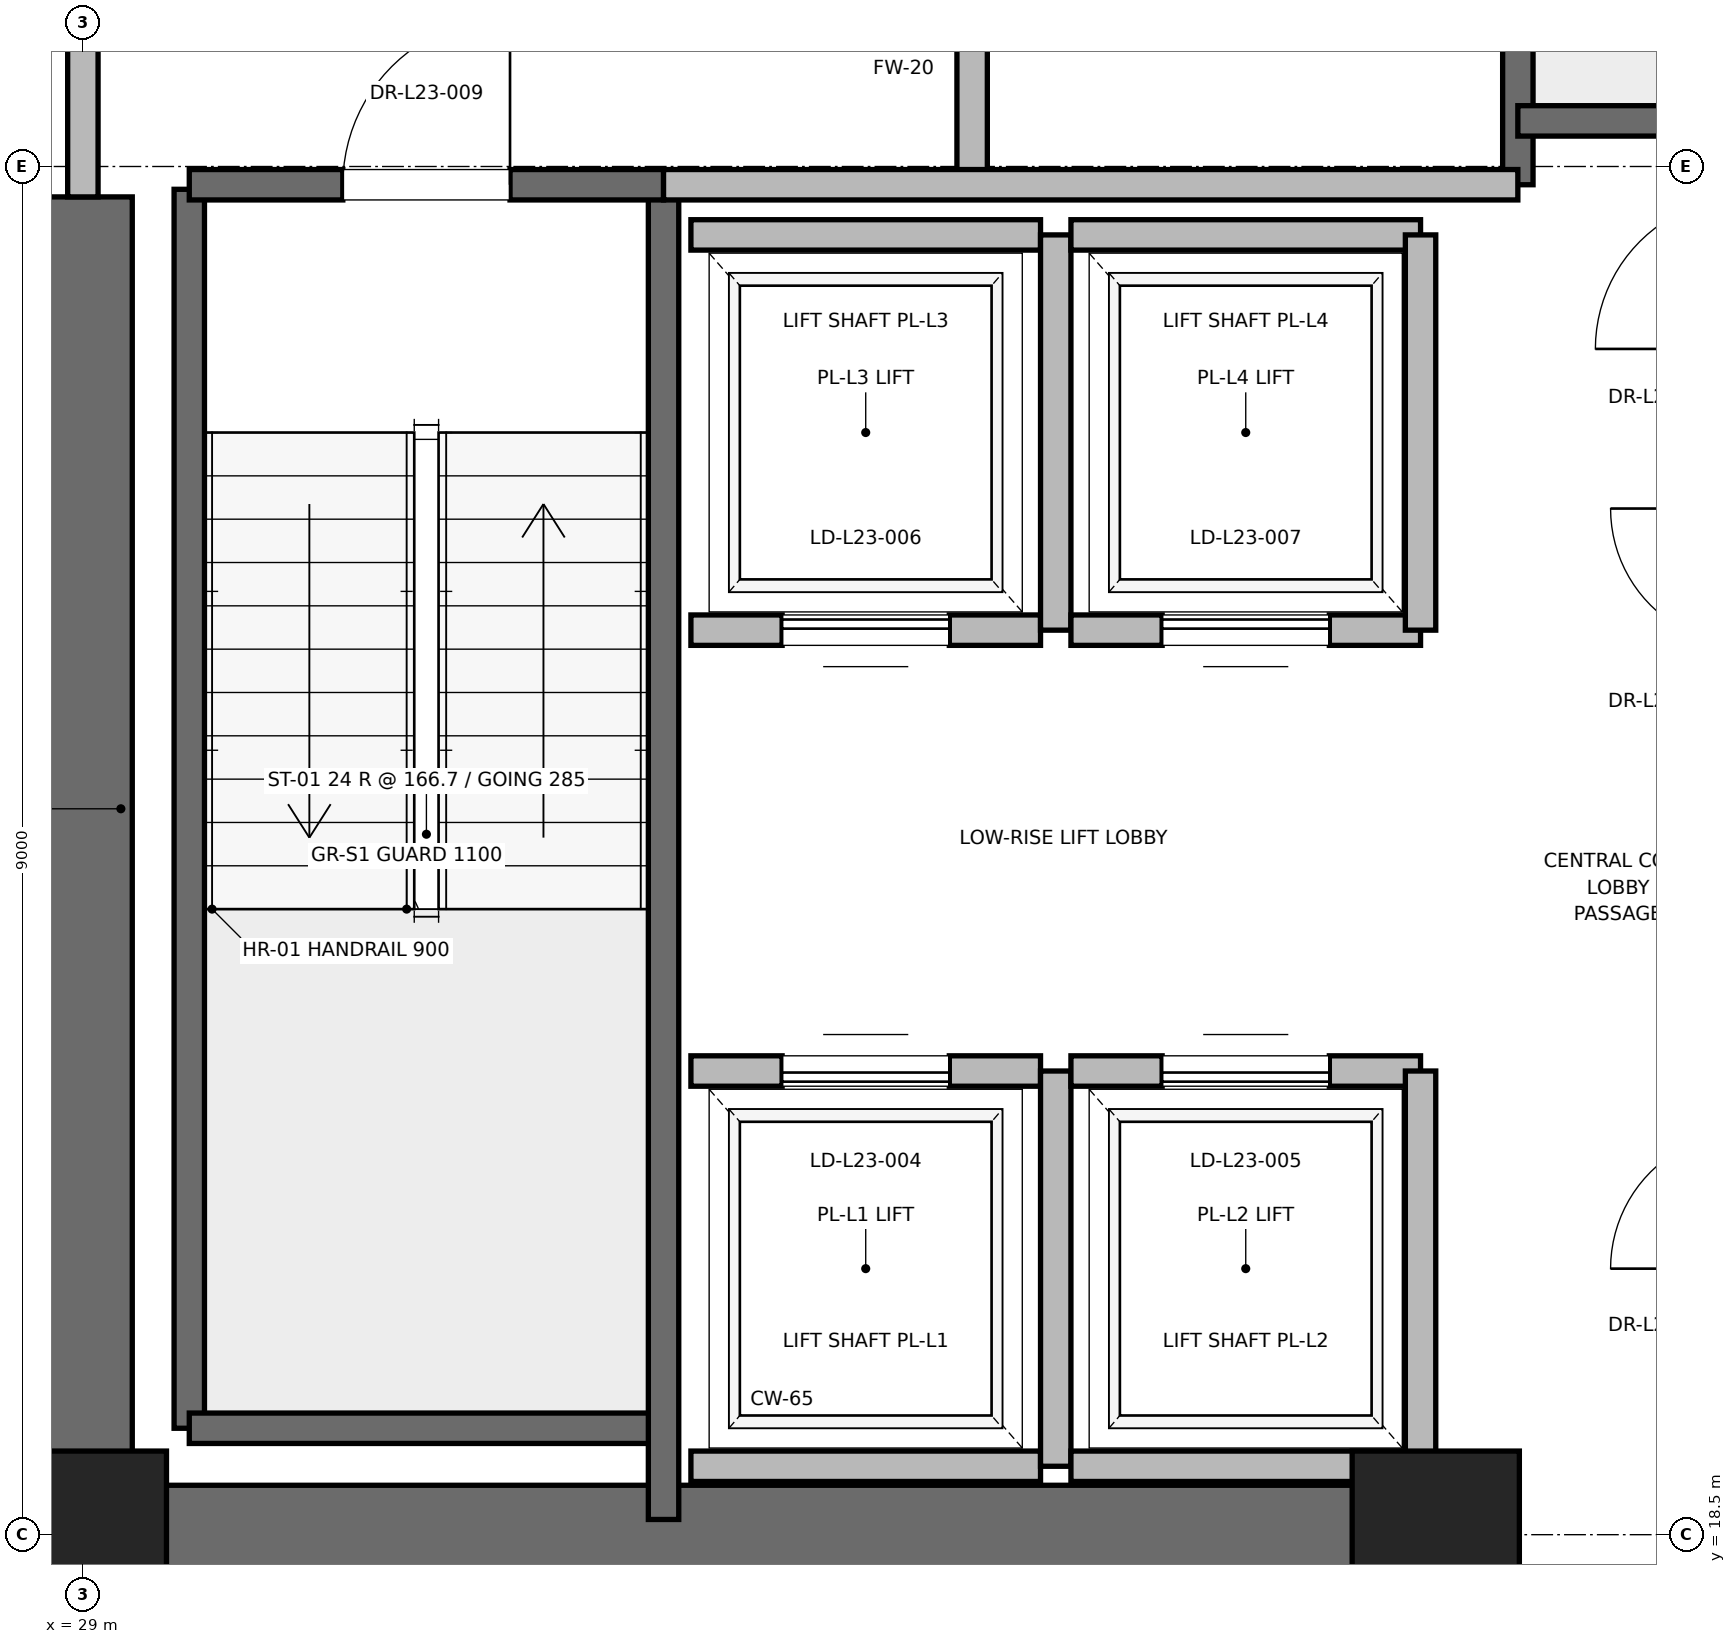
"""IFC4 building model, lengths in metres.
Left out: names, types, materials, properties, quantities, classifications, styles, units other than length and angle.
Written with IfcOpenShell. Run it as: python <this file> out.ifc"""

import sys

from ifc_helpers import new_model, si_unit, direction, frame, frame_2d, origin, origin_2d, place, context, subcontext, project, spatial, rectangle, extrude, element, fill, save


model = new_model("IFC4")
c1 = context("Model", 3, precision=1e-05, world=origin(), true_north=direction((0.0, 1.0)))
c2 = subcontext(c1, "Body", "Model", "MODEL_VIEW")
j1 = project(units=[si_unit("LENGTHUNIT", "METRE"), si_unit("PLANEANGLEUNIT", "RADIAN")], contexts=[c1])
p1 = place(None, origin())
s1 = spatial("IfcSite", under=j1, at=p1, CompositionType="ELEMENT")
p2 = place(p1, origin())
s2 = spatial("IfcBuilding", under=s1, at=p2, CompositionType="ELEMENT")
p3 = place(p2, frame((0.0, 0.0, 99.6)))
s3 = spatial("IfcBuildingStorey", under=s2, at=p3, CompositionType="ELEMENT", Elevation=99.6)
for number, where, z_axis, x_axis in (
    (1, (29.0, 18.5, 0.0), (0.0, 0.0, 1.0), (1.0, 0.0, 0.0)),
    (2, (37.9, 18.5, 0.0), (0.0, 0.0, 1.0), (1.0, 0.0, 0.0)),
):
    element("IfcColumn", number, at=place(p3, frame(where, z_axis=z_axis, x_axis=x_axis)), inside=s3, PredefinedType="PILASTER", context=c2, shape_type="SweptSolid", body=[
        extrude(rectangle(XDim=1.1, YDim=1.1, at=origin_2d()), origin(), (0.0, 0.0, 1.0), 4.0),
    ])
p4 = place(p3, frame((29.0, 18.5, 0.0), z_axis=(0.0, 0.0, 1.0), x_axis=(1.0, 0.0, 0.0)))
e3 = element("IfcWall", 3, at=p4, inside=s3, PredefinedType="SHEAR", context=c2, shape_type="SweptSolid", body=[
    extrude(rectangle(XDim=9.2, YDim=0.65, at=frame_2d((4.6, 0.0))), origin(), (0.0, 0.0, 1.0), 3.76),
])
p5 = place(p3, frame((29.0, 18.5, 0.0), z_axis=(0.0, 0.0, 1.0), x_axis=(0.0, 1.0, 0.0)))
e4 = element("IfcWall", 4, at=p5, inside=s3, PredefinedType="SHEAR", context=c2, shape_type="SweptSolid", body=[
    extrude(rectangle(XDim=8.8, YDim=0.65, at=frame_2d((4.4, 0.0))), origin(), (0.0, 0.0, 1.0), 3.76),
])
p6 = place(p3, frame((29.7, 19.2, 0.0), z_axis=(0.0, 0.0, 1.0), x_axis=(0.0, 1.0, 0.0)))
e5 = element("IfcWall", 5, at=p6, inside=s3, PredefinedType="SOLIDWALL", context=c2, shape_type="SweptSolid", body=[
    extrude(rectangle(XDim=8.15, YDim=0.2, at=frame_2d((4.075, 0.0))), origin(), (0.0, 0.0, 1.0), 3.76),
])
p7 = place(p3, frame((29.7, 19.2, 0.0), z_axis=(0.0, 0.0, 1.0), x_axis=(1.0, 0.0, 0.0)))
e6 = element("IfcWall", 6, at=p7, inside=s3, PredefinedType="SOLIDWALL", context=c2, shape_type="SweptSolid", body=[
    extrude(rectangle(XDim=3.12, YDim=0.2, at=frame_2d((1.56, 0.0))), origin(), (0.0, 0.0, 1.0), 3.76),
])
p8 = place(p3, frame((32.82, 18.6, 0.0), z_axis=(0.0, 0.0, 1.0), x_axis=(0.0, 1.0, 0.0)))
e7 = element("IfcWall", 7, at=p8, inside=s3, PredefinedType="SOLIDWALL", context=c2, shape_type="SweptSolid", body=[
    extrude(rectangle(XDim=8.78, YDim=0.2, at=frame_2d((4.39, 0.0))), origin(), (0.0, 0.0, 1.0), 3.76),
])
p9 = place(p3, frame((29.7, 27.38, 0.0), z_axis=(0.0, 0.0, 1.0), x_axis=(1.0, 0.0, 0.0)))
e8 = element("IfcWall", 8, at=p9, inside=s3, PredefinedType="SOLIDWALL", context=c2, shape_type="SweptSolid", body=[
    extrude(rectangle(XDim=3.12, YDim=0.2, at=frame_2d((1.56, 0.0))), origin(), (0.0, 0.0, 1.0), 3.76),
])
p10 = place(p9, frame((1.01, 0.0, 0.0)))
e9 = element("IfcOpeningElement", 9, at=p10, cuts=e8, PredefinedType="OPENING", context=c2, shape_type="SweptSolid", body=[
    extrude(rectangle(XDim=1.1, YDim=2.15, at=frame_2d((0.55, 1.075))), frame((0.0, 0.1, 0.0), z_axis=(0.0, -1.0, 0.0), x_axis=(1.0, 0.0, 0.0)), (0.0, 0.0, 1.0), 0.2),
])
p11 = place(p3, frame((38.44, 27.38, 0.0), z_axis=(0.0, 0.0, 1.0), x_axis=(0.0, 1.0, 0.0)))
e10 = element("IfcWall", 10, at=p11, inside=s3, PredefinedType="SOLIDWALL", context=c2, shape_type="SweptSolid", body=[
    extrude(rectangle(XDim=8.87, YDim=0.2, at=frame_2d((4.435, 0.0))), origin(), (0.0, 0.0, 1.0), 3.76),
])
p12 = place(p3, frame((38.44, 27.8, 0.0), z_axis=(0.0, 0.0, 1.0), x_axis=(1.0, 0.0, 0.0)))
e11 = element("IfcWall", 11, at=p12, inside=s3, PredefinedType="SOLIDWALL", context=c2, shape_type="SweptSolid", body=[
    extrude(rectangle(XDim=3.32, YDim=0.2, at=frame_2d((1.66, 0.0))), origin(), (0.0, 0.0, 1.0), 3.76),
])
p13 = place(p3, frame((34.85, 27.38, 0.0), z_axis=(0.0, 0.0, 1.0), x_axis=(0.0, 1.0, 0.0)))
e12 = element("IfcWall", 12, at=p13, inside=s3, PredefinedType="PARTITIONING", context=c2, shape_type="SweptSolid", body=[
    extrude(rectangle(XDim=3.37, YDim=0.2, at=frame_2d((1.685, 0.0))), origin(), (0.0, 0.0, 1.0), 3.76),
])
p14 = place(p13, frame((1.11, 0.0, 0.0)))
e13 = element("IfcOpeningElement", 13, at=p14, cuts=e12, PredefinedType="OPENING", context=c2, shape_type="SweptSolid", body=[
    extrude(rectangle(XDim=1.15, YDim=2.2, at=frame_2d((0.575, 1.1))), frame((0.0, 0.1, 0.0), z_axis=(0.0, -1.0, 0.0), x_axis=(1.0, 0.0, 0.0)), (0.0, 0.0, 1.0), 0.2),
])
p15 = place(p3, frame((29.0, 27.3, 0.0), z_axis=(0.0, 0.0, 1.0), x_axis=(0.0, 1.0, 0.0)))
e14 = element("IfcWall", 14, at=p15, inside=s3, PredefinedType="PARTITIONING", context=c2, shape_type="SweptSolid", body=[
    extrude(rectangle(XDim=3.4, YDim=0.2, at=frame_2d((1.7, 0.0))), origin(), (0.0, 0.0, 1.0), 2.54),
])
p16 = place(p15, frame((1.125, 0.0, 0.0)))
e15 = element("IfcOpeningElement", 15, at=p16, cuts=e14, PredefinedType="OPENING", context=c2, shape_type="SweptSolid", body=[
    extrude(rectangle(XDim=1.15, YDim=2.2, at=frame_2d((0.575, 1.1))), frame((0.0, 0.1, 0.0), z_axis=(0.0, -1.0, 0.0), x_axis=(1.0, 0.0, 0.0)), (0.0, 0.0, 1.0), 0.2),
])
p17 = place(p3, frame((32.82, 27.38, 0.0), z_axis=(0.0, 0.0, 1.0), x_axis=(1.0, 0.0, 0.0)))
e16 = element("IfcWall", 16, at=p17, inside=s3, PredefinedType="PARTITIONING", context=c2, shape_type="SweptSolid", body=[
    extrude(rectangle(XDim=5.62, YDim=0.2, at=frame_2d((2.81, 0.0))), origin(), (0.0, 0.0, 1.0), 3.76),
])
p18 = place(p3, frame((33.0, 18.95, 0.0), z_axis=(0.0, 0.0, 1.0), x_axis=(1.0, 0.0, 0.0)))
e17 = element("IfcWall", 17, at=p18, inside=s3, PredefinedType="SOLIDWALL", context=c2, shape_type="SweptSolid", body=[
    extrude(rectangle(XDim=2.3, YDim=0.2, at=frame_2d((1.15, 0.0))), origin(), (0.0, 0.0, 1.0), 3.76),
])
p19 = place(p3, frame((35.3, 21.55, 0.0), z_axis=(0.0, 0.0, 1.0), x_axis=(-1.0, 0.0, 0.0)))
e18 = element("IfcWall", 18, at=p19, inside=s3, PredefinedType="SOLIDWALL", context=c2, shape_type="SweptSolid", body=[
    extrude(rectangle(XDim=2.3, YDim=0.2, at=frame_2d((1.15, 0.0))), origin(), (0.0, 0.0, 1.0), 3.76),
])
p20 = place(p19, frame((0.6, 0.0, 0.0)))
e19 = element("IfcOpeningElement", 19, at=p20, cuts=e18, PredefinedType="OPENING", context=c2, shape_type="SweptSolid", body=[
    extrude(rectangle(XDim=1.1, YDim=2.2, at=frame_2d((0.55, 1.1))), frame((0.0, 0.1, 0.0), z_axis=(0.0, -1.0, 0.0), x_axis=(1.0, 0.0, 0.0)), (0.0, 0.0, 1.0), 0.2),
])
p21 = place(p3, frame((35.4, 18.95, 0.0), z_axis=(0.0, 0.0, 1.0), x_axis=(0.0, 1.0, 0.0)))
e20 = element("IfcWall", 20, at=p21, inside=s3, PredefinedType="SOLIDWALL", context=c2, shape_type="SweptSolid", body=[
    extrude(rectangle(XDim=2.6, YDim=0.2, at=frame_2d((1.3, 0.0))), origin(), (0.0, 0.0, 1.0), 3.76),
])
p22 = place(p3, frame((35.5, 18.95, 0.0), z_axis=(0.0, 0.0, 1.0), x_axis=(1.0, 0.0, 0.0)))
e21 = element("IfcWall", 21, at=p22, inside=s3, PredefinedType="SOLIDWALL", context=c2, shape_type="SweptSolid", body=[
    extrude(rectangle(XDim=2.3, YDim=0.2, at=frame_2d((1.15, 0.0))), origin(), (0.0, 0.0, 1.0), 2.54),
])
p23 = place(p3, frame((37.8, 21.55, 0.0), z_axis=(0.0, 0.0, 1.0), x_axis=(-1.0, 0.0, 0.0)))
e22 = element("IfcWall", 22, at=p23, inside=s3, PredefinedType="SOLIDWALL", context=c2, shape_type="SweptSolid", body=[
    extrude(rectangle(XDim=2.3, YDim=0.2, at=frame_2d((1.15, 0.0))), origin(), (0.0, 0.0, 1.0), 3.76),
])
p24 = place(p23, frame((0.6, 0.0, 0.0)))
e23 = element("IfcOpeningElement", 23, at=p24, cuts=e22, PredefinedType="OPENING", context=c2, shape_type="SweptSolid", body=[
    extrude(rectangle(XDim=1.1, YDim=2.2, at=frame_2d((0.55, 1.1))), frame((0.0, 0.1, 0.0), z_axis=(0.0, -1.0, 0.0), x_axis=(1.0, 0.0, 0.0)), (0.0, 0.0, 1.0), 0.2),
])
p25 = place(p3, frame((37.8, 18.95, 0.0), z_axis=(0.0, 0.0, 1.0), x_axis=(0.0, 1.0, 0.0)))
e24 = element("IfcWall", 24, at=p25, inside=s3, PredefinedType="SOLIDWALL", context=c2, shape_type="SweptSolid", body=[
    extrude(rectangle(XDim=2.6, YDim=0.2, at=frame_2d((1.3, 0.0))), origin(), (0.0, 0.0, 1.0), 2.54),
])
p26 = place(p3, frame((33.0, 24.45, 0.0), z_axis=(0.0, 0.0, 1.0), x_axis=(1.0, 0.0, 0.0)))
e25 = element("IfcWall", 25, at=p26, inside=s3, PredefinedType="SOLIDWALL", context=c2, shape_type="SweptSolid", body=[
    extrude(rectangle(XDim=2.3, YDim=0.2, at=frame_2d((1.15, 0.0))), origin(), (0.0, 0.0, 1.0), 3.76),
])
p27 = place(p26, frame((0.6, 0.0, 0.0)))
e26 = element("IfcOpeningElement", 26, at=p27, cuts=e25, PredefinedType="OPENING", context=c2, shape_type="SweptSolid", body=[
    extrude(rectangle(XDim=1.1, YDim=2.2, at=frame_2d((0.55, 1.1))), frame((0.0, 0.1, 0.0), z_axis=(0.0, -1.0, 0.0), x_axis=(1.0, 0.0, 0.0)), (0.0, 0.0, 1.0), 0.2),
])
p28 = place(p3, frame((35.3, 27.05, 0.0), z_axis=(0.0, 0.0, 1.0), x_axis=(-1.0, 0.0, 0.0)))
e27 = element("IfcWall", 27, at=p28, inside=s3, PredefinedType="SOLIDWALL", context=c2, shape_type="SweptSolid", body=[
    extrude(rectangle(XDim=2.3, YDim=0.2, at=frame_2d((1.15, 0.0))), origin(), (0.0, 0.0, 1.0), 3.76),
])
p29 = place(p3, frame((35.4, 24.45, 0.0), z_axis=(0.0, 0.0, 1.0), x_axis=(0.0, 1.0, 0.0)))
e28 = element("IfcWall", 28, at=p29, inside=s3, PredefinedType="SOLIDWALL", context=c2, shape_type="SweptSolid", body=[
    extrude(rectangle(XDim=2.6, YDim=0.2, at=frame_2d((1.3, 0.0))), origin(), (0.0, 0.0, 1.0), 3.76),
])
p30 = place(p3, frame((35.5, 24.45, 0.0), z_axis=(0.0, 0.0, 1.0), x_axis=(1.0, 0.0, 0.0)))
e29 = element("IfcWall", 29, at=p30, inside=s3, PredefinedType="SOLIDWALL", context=c2, shape_type="SweptSolid", body=[
    extrude(rectangle(XDim=2.3, YDim=0.2, at=frame_2d((1.15, 0.0))), origin(), (0.0, 0.0, 1.0), 3.76),
])
p31 = place(p30, frame((0.6, 0.0, 0.0)))
e30 = element("IfcOpeningElement", 30, at=p31, cuts=e29, PredefinedType="OPENING", context=c2, shape_type="SweptSolid", body=[
    extrude(rectangle(XDim=1.1, YDim=2.2, at=frame_2d((0.55, 1.1))), frame((0.0, 0.1, 0.0), z_axis=(0.0, -1.0, 0.0), x_axis=(1.0, 0.0, 0.0)), (0.0, 0.0, 1.0), 0.2),
])
p32 = place(p3, frame((37.8, 27.05, 0.0), z_axis=(0.0, 0.0, 1.0), x_axis=(-1.0, 0.0, 0.0)))
e31 = element("IfcWall", 31, at=p32, inside=s3, PredefinedType="SOLIDWALL", context=c2, shape_type="SweptSolid", body=[
    extrude(rectangle(XDim=2.3, YDim=0.2, at=frame_2d((1.15, 0.0))), origin(), (0.0, 0.0, 1.0), 3.76),
])
p33 = place(p3, frame((37.8, 24.45, 0.0), z_axis=(0.0, 0.0, 1.0), x_axis=(0.0, 1.0, 0.0)))
e32 = element("IfcWall", 32, at=p33, inside=s3, PredefinedType="SOLIDWALL", context=c2, shape_type="SweptSolid", body=[
    extrude(rectangle(XDim=2.6, YDim=0.2, at=frame_2d((1.3, 0.0))), origin(), (0.0, 0.0, 1.0), 3.76),
])
p34 = place(p10, origin())
e33 = element("IfcDoor", 33, at=p34, inside=s3, OperationType="SINGLE_SWING_RIGHT", PredefinedType="DOOR", context=c2, shape_type="SweptSolid", body=[
    extrude(rectangle(XDim=1.1, YDim=2.15, at=frame_2d((0.55, 1.075))), frame((0.0, 0.025, 0.0), z_axis=(0.0, -1.0, 0.0), x_axis=(1.0, 0.0, 0.0)), (0.0, 0.0, 1.0), 0.05),
])
fill(e9, e33)
p35 = place(p20, origin())
e34 = element("IfcDoor", 34, at=p35, inside=s3, OperationType="SLIDING_TO_RIGHT", PredefinedType="DOOR", context=c2, shape_type="SweptSolid", body=[
    extrude(rectangle(XDim=1.1, YDim=2.2, at=frame_2d((0.55, 1.1))), frame((0.0, 0.025, 0.0), z_axis=(0.0, -1.0, 0.0), x_axis=(1.0, 0.0, 0.0)), (0.0, 0.0, 1.0), 0.05),
])
fill(e19, e34)
p36 = place(p24, origin())
e35 = element("IfcDoor", 35, at=p36, inside=s3, OperationType="SLIDING_TO_RIGHT", PredefinedType="DOOR", context=c2, shape_type="SweptSolid", body=[
    extrude(rectangle(XDim=1.1, YDim=2.2, at=frame_2d((0.55, 1.1))), frame((0.0, 0.025, 0.0), z_axis=(0.0, -1.0, 0.0), x_axis=(1.0, 0.0, 0.0)), (0.0, 0.0, 1.0), 0.05),
])
fill(e23, e35)
p37 = place(p27, origin())
e36 = element("IfcDoor", 36, at=p37, inside=s3, OperationType="SLIDING_TO_RIGHT", PredefinedType="DOOR", context=c2, shape_type="SweptSolid", body=[
    extrude(rectangle(XDim=1.1, YDim=2.2, at=frame_2d((0.55, 1.1))), frame((0.0, 0.025, 0.0), z_axis=(0.0, -1.0, 0.0), x_axis=(1.0, 0.0, 0.0)), (0.0, 0.0, 1.0), 0.05),
])
fill(e26, e36)
p38 = place(p31, origin())
e37 = element("IfcDoor", 37, at=p38, inside=s3, OperationType="SLIDING_TO_RIGHT", PredefinedType="DOOR", context=c2, shape_type="SweptSolid", body=[
    extrude(rectangle(XDim=1.1, YDim=2.2, at=frame_2d((0.55, 1.1))), frame((0.0, 0.025, 0.0), z_axis=(0.0, -1.0, 0.0), x_axis=(1.0, 0.0, 0.0)), (0.0, 0.0, 1.0), 0.05),
])
fill(e30, e37)
save(model, sys.argv[1])
